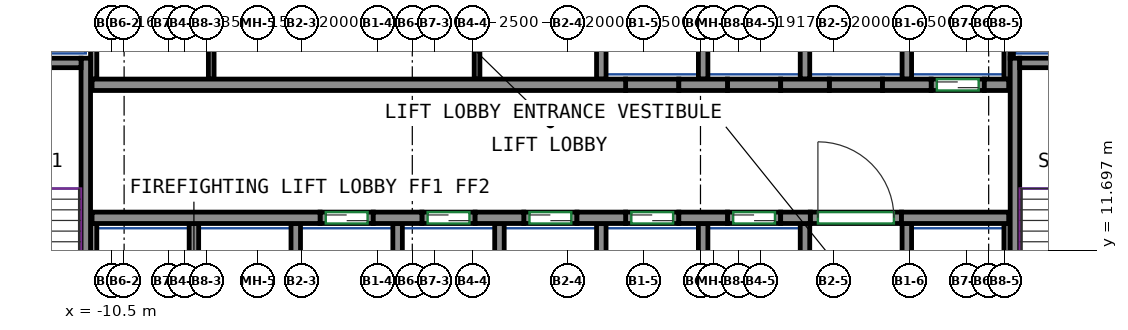
"""IFC4 building model, lengths in metres.
Left out: names, types, materials, properties, quantities, classifications, styles, units other than length and angle.
Written with IfcOpenShell. Run it as: python <this file> out.ifc"""

import sys

from ifc_helpers import new_model, si_unit, direction, frame, frame_2d, origin, place, context, subcontext, project, spatial, rectangle, extrude, source, transform, mapped, element, fill, save


model = new_model("IFC4")
c1 = context("Model", 3, precision=1e-05, world=origin(), true_north=direction((0.0, 1.0)))
c2 = subcontext(c1, "Body", "Model", "MODEL_VIEW")
j1 = project(units=[si_unit("LENGTHUNIT", "METRE"), si_unit("PLANEANGLEUNIT", "RADIAN")], contexts=[c1])
p1 = place(None, origin())
s1 = spatial("IfcSite", under=j1, at=p1, CompositionType="ELEMENT")
p2 = place(p1, origin())
s2 = spatial("IfcBuilding", under=s1, at=p2, CompositionType="ELEMENT")
p3 = place(p2, frame((0.0, 0.0, 216.9)))
s3 = spatial("IfcBuildingStorey", under=s2, at=p3, CompositionType="ELEMENT", Elevation=216.9)
m1 = source(origin(), c2, "Body", "SweptSolid", [
    extrude(rectangle(XDim=7.75, YDim=0.25, at=frame_2d((3.875, 0.0))), origin(), (0.0, 0.0, 1.0), 3.12),
])
p4 = place(p3, frame((-11.175, 9.0, 0.0), z_axis=(0.0, 0.0, 1.0), x_axis=(0.0, 1.0, 0.0)))
e1 = element("IfcWall", 1, at=p4, inside=s3, PredefinedType="SHEAR", context=c2, shape_type="MappedRepresentation", body=[
    mapped(m1, transform((0.0, 0.0, 0.0))),
])
m2 = source(origin(), c2, "Body", "SweptSolid", [
    extrude(rectangle(XDim=3.7, YDim=0.25, at=frame_2d((1.85, 0.0))), origin(), (0.0, 0.0, 1.0), 3.12),
])
p5 = place(p3, frame((-15.0, 16.625, 0.0), z_axis=(0.0, 0.0, 1.0), x_axis=(1.0, 0.0, 0.0)))
e2 = element("IfcWall", 2, at=p5, inside=s3, PredefinedType="SHEAR", context=c2, shape_type="MappedRepresentation", body=[
    mapped(m2, transform((0.0, 0.0, 0.0))),
])
p6 = place(p3, frame((13.275, 9.0, 0.0), z_axis=(0.0, 0.0, 1.0), x_axis=(0.0, 1.0, 0.0)))
e3 = element("IfcWall", 3, at=p6, inside=s3, PredefinedType="SHEAR", context=c2, shape_type="MappedRepresentation", body=[
    mapped(m1, transform((0.0, 0.0, 0.0))),
])
m3 = source(origin(), c2, "Body", "SweptSolid", [
    extrude(rectangle(XDim=3.7, YDim=0.25, at=frame_2d((1.85, 0.0))), origin(), (0.0, 0.0, 1.0), 3.12),
])
p7 = place(p3, frame((13.4, 16.625, 0.0), z_axis=(0.0, 0.0, 1.0), x_axis=(1.0, 0.0, 0.0)))
e4 = element("IfcWall", 4, at=p7, inside=s3, PredefinedType="SHEAR", context=c2, shape_type="MappedRepresentation", body=[
    mapped(m3, transform((0.0, 0.0, 0.0))),
])
m4 = source(origin(), c2, "Body", "SweptSolid", [
    extrude(rectangle(XDim=6.0, YDim=0.3, at=frame_2d((3.0, 0.0))), origin(), (0.0, 0.0, 1.0), 3.12),
])
p8 = place(p3, frame((-11.01, 12.55, 0.0), z_axis=(0.0, 0.0, 1.0), x_axis=(1.0, 0.0, 0.0)))
e5 = element("IfcWall", 5, at=p8, inside=s3, PredefinedType="SHEAR", context=c2, shape_type="MappedRepresentation", body=[
    mapped(m4, transform((0.0, 0.0, 0.0))),
])
m5 = source(origin(), c2, "Body", "SweptSolid", [
    extrude(rectangle(XDim=1.28, YDim=0.3, at=frame_2d((0.64, 0.0))), origin(), (0.0, 0.0, 1.0), 3.12),
])
for number, where, z_axis, x_axis in (
    (6, (-3.61, 12.55, 0.0), (0.0, 0.0, 1.0), (1.0, 0.0, 0.0)),
    (7, (-0.93, 12.55, 0.0), (0.0, 0.0, 1.0), (1.0, 0.0, 0.0)),
    (8, (1.75, 12.55, 0.0), (0.0, 0.0, 1.0), (1.0, 0.0, 0.0)),
    (9, (4.43, 12.55, 0.0), (0.0, 0.0, 1.0), (1.0, 0.0, 0.0)),
):
    element("IfcWall", number, at=place(p3, frame(where, z_axis=z_axis, x_axis=x_axis)), inside=s3, PredefinedType="SHEAR", context=c2, shape_type="MappedRepresentation", body=[
        mapped(m5, transform((0.0, 0.0, 0.0))),
    ])
m6 = source(origin(), c2, "Body", "SweptSolid", [
    extrude(rectangle(XDim=0.78, YDim=0.3, at=frame_2d((0.39, 0.0))), origin(), (0.0, 0.0, 1.0), 3.12),
])
p9 = place(p3, frame((7.11, 12.55, 0.0), z_axis=(0.0, 0.0, 1.0), x_axis=(1.0, 0.0, 0.0)))
e10 = element("IfcWall", 10, at=p9, inside=s3, PredefinedType="SHEAR", context=c2, shape_type="MappedRepresentation", body=[
    mapped(m6, transform((0.0, 0.0, 0.0))),
])
m7 = source(origin(), c2, "Body", "SweptSolid", [
    extrude(rectangle(XDim=2.82, YDim=0.3, at=frame_2d((1.41, 0.0))), origin(), (0.0, 0.0, 1.0), 3.12),
])
p10 = place(p3, frame((10.29, 12.55, 0.0), z_axis=(0.0, 0.0, 1.0), x_axis=(1.0, 0.0, 0.0)))
e11 = element("IfcWall", 11, at=p10, inside=s3, PredefinedType="SHEAR", context=c2, shape_type="MappedRepresentation", body=[
    mapped(m7, transform((0.0, 0.0, 0.0))),
])
m8 = source(origin(), c2, "Body", "SweptSolid", [
    extrude(rectangle(XDim=14.04, YDim=0.3, at=frame_2d((7.02, 0.0))), origin(), (0.0, 0.0, 1.0), 3.12),
])
p11 = place(p3, frame((-11.01, 16.05, 0.0), z_axis=(0.0, 0.0, 1.0), x_axis=(1.0, 0.0, 0.0)))
e12 = element("IfcWall", 12, at=p11, inside=s3, PredefinedType="SHEAR", context=c2, shape_type="MappedRepresentation", body=[
    mapped(m8, transform((0.0, 0.0, 0.0))),
])
p12 = place(p3, frame((4.43, 16.05, 0.0), z_axis=(0.0, 0.0, 1.0), x_axis=(1.0, 0.0, 0.0)))
e13 = element("IfcWall", 13, at=p12, inside=s3, PredefinedType="SHEAR", context=c2, shape_type="MappedRepresentation", body=[
    mapped(m5, transform((0.0, 0.0, 0.0))),
])
m9 = source(origin(), c2, "Body", "SweptSolid", [
    extrude(rectangle(XDim=1.28, YDim=0.3, at=frame_2d((0.64, 0.0))), origin(), (0.0, 0.0, 1.0), 3.12),
])
p13 = place(p3, frame((7.11, 16.05, 0.0), z_axis=(0.0, 0.0, 1.0), x_axis=(1.0, 0.0, 0.0)))
e14 = element("IfcWall", 14, at=p13, inside=s3, PredefinedType="SHEAR", context=c2, shape_type="MappedRepresentation", body=[
    mapped(m9, transform((0.0, 0.0, 0.0))),
])
p14 = place(p3, frame((9.79, 16.05, 0.0), z_axis=(0.0, 0.0, 1.0), x_axis=(1.0, 0.0, 0.0)))
e15 = element("IfcWall", 15, at=p14, inside=s3, PredefinedType="SHEAR", context=c2, shape_type="MappedRepresentation", body=[
    mapped(m5, transform((0.0, 0.0, 0.0))),
])
m10 = source(origin(), c2, "Body", "SweptSolid", [
    extrude(rectangle(XDim=0.64, YDim=0.3, at=frame_2d((0.32, 0.0))), origin(), (0.0, 0.0, 1.0), 3.12),
])
p15 = place(p3, frame((12.47, 16.05, 0.0), z_axis=(0.0, 0.0, 1.0), x_axis=(1.0, 0.0, 0.0)))
e16 = element("IfcWall", 16, at=p15, inside=s3, PredefinedType="SHEAR", context=c2, shape_type="MappedRepresentation", body=[
    mapped(m10, transform((0.0, 0.0, 0.0))),
])
m11 = source(origin(), c2, "Body", "SweptSolid", [
    extrude(rectangle(XDim=1.4, YDim=0.3, at=frame_2d((0.7, 0.0))), origin(), (0.0, 0.0, 1.0), 3.12),
])
p16 = place(p3, frame((-5.01, 12.55, 0.0), z_axis=(0.0, 0.0, 1.0), x_axis=(1.0, 0.0, 0.0)))
e17 = element("IfcWall", 17, at=p16, inside=s3, PredefinedType="PARTITIONING", context=c2, shape_type="MappedRepresentation", body=[
    mapped(m11, transform((0.0, 0.0, 0.0))),
])
p17 = place(p16, frame((0.15, 0.0, 0.0)))
e18 = element("IfcOpeningElement", 18, at=p17, cuts=e17, PredefinedType="OPENING", context=c2, shape_type="SweptSolid", body=[
    extrude(rectangle(XDim=1.1, YDim=2.1, at=frame_2d((0.55, 1.05))), frame((0.0, 0.16, 0.0), z_axis=(0.0, -1.0, 0.0), x_axis=(1.0, 0.0, 0.0)), (0.0, 0.0, 1.0), 0.32),
])
m12 = source(origin(), c2, "Body", "SweptSolid", [
    extrude(rectangle(XDim=1.4, YDim=0.3, at=frame_2d((0.7, 0.0))), origin(), (0.0, 0.0, 1.0), 3.12),
])
p18 = place(p3, frame((-2.33, 12.55, 0.0), z_axis=(0.0, 0.0, 1.0), x_axis=(1.0, 0.0, 0.0)))
e19 = element("IfcWall", 19, at=p18, inside=s3, PredefinedType="PARTITIONING", context=c2, shape_type="MappedRepresentation", body=[
    mapped(m12, transform((0.0, 0.0, 0.0))),
])
p19 = place(p18, frame((0.15, 0.0, 0.0)))
e20 = element("IfcOpeningElement", 20, at=p19, cuts=e19, PredefinedType="OPENING", context=c2, shape_type="SweptSolid", body=[
    extrude(rectangle(XDim=1.1, YDim=2.1, at=frame_2d((0.55, 1.05))), frame((0.0, 0.16, 0.0), z_axis=(0.0, -1.0, 0.0), x_axis=(1.0, 0.0, 0.0)), (0.0, 0.0, 1.0), 0.32),
])
p20 = place(p3, frame((0.35, 12.55, 0.0), z_axis=(0.0, 0.0, 1.0), x_axis=(1.0, 0.0, 0.0)))
e21 = element("IfcWall", 21, at=p20, inside=s3, PredefinedType="PARTITIONING", context=c2, shape_type="MappedRepresentation", body=[
    mapped(m11, transform((0.0, 0.0, 0.0))),
])
p21 = place(p20, frame((0.15, 0.0, 0.0)))
e22 = element("IfcOpeningElement", 22, at=p21, cuts=e21, PredefinedType="OPENING", context=c2, shape_type="SweptSolid", body=[
    extrude(rectangle(XDim=1.1, YDim=2.1, at=frame_2d((0.55, 1.05))), frame((0.0, 0.16, 0.0), z_axis=(0.0, -1.0, 0.0), x_axis=(1.0, 0.0, 0.0)), (0.0, 0.0, 1.0), 0.32),
])
p22 = place(p3, frame((3.03, 12.55, 0.0), z_axis=(0.0, 0.0, 1.0), x_axis=(1.0, 0.0, 0.0)))
e23 = element("IfcWall", 23, at=p22, inside=s3, PredefinedType="PARTITIONING", context=c2, shape_type="MappedRepresentation", body=[
    mapped(m11, transform((0.0, 0.0, 0.0))),
])
p23 = place(p22, frame((0.15, 0.0, 0.0)))
e24 = element("IfcOpeningElement", 24, at=p23, cuts=e23, PredefinedType="OPENING", context=c2, shape_type="SweptSolid", body=[
    extrude(rectangle(XDim=1.1, YDim=2.1, at=frame_2d((0.55, 1.05))), frame((0.0, 0.16, 0.0), z_axis=(0.0, -1.0, 0.0), x_axis=(1.0, 0.0, 0.0)), (0.0, 0.0, 1.0), 0.32),
])
p24 = place(p3, frame((5.71, 12.55, 0.0), z_axis=(0.0, 0.0, 1.0), x_axis=(1.0, 0.0, 0.0)))
e25 = element("IfcWall", 25, at=p24, inside=s3, PredefinedType="PARTITIONING", context=c2, shape_type="MappedRepresentation", body=[
    mapped(m12, transform((0.0, 0.0, 0.0))),
])
p25 = place(p24, frame((0.15, 0.0, 0.0)))
e26 = element("IfcOpeningElement", 26, at=p25, cuts=e25, PredefinedType="OPENING", context=c2, shape_type="SweptSolid", body=[
    extrude(rectangle(XDim=1.1, YDim=2.1, at=frame_2d((0.55, 1.05))), frame((0.0, 0.16, 0.0), z_axis=(0.0, -1.0, 0.0), x_axis=(1.0, 0.0, 0.0)), (0.0, 0.0, 1.0), 0.32),
])
p26 = place(p3, frame((11.07, 16.05, 0.0), z_axis=(0.0, 0.0, 1.0), x_axis=(1.0, 0.0, 0.0)))
e27 = element("IfcWall", 27, at=p26, inside=s3, PredefinedType="PARTITIONING", context=c2, shape_type="MappedRepresentation", body=[
    mapped(m11, transform((0.0, 0.0, 0.0))),
])
p27 = place(p26, frame((0.15, 0.0, 0.0)))
e28 = element("IfcOpeningElement", 28, at=p27, cuts=e27, PredefinedType="OPENING", context=c2, shape_type="SweptSolid", body=[
    extrude(rectangle(XDim=1.1, YDim=2.1, at=frame_2d((0.55, 1.05))), frame((0.0, 0.16, 0.0), z_axis=(0.0, -1.0, 0.0), x_axis=(1.0, 0.0, 0.0)), (0.0, 0.0, 1.0), 0.32),
])
m13 = source(origin(), c2, "Body", "SweptSolid", [
    extrude(rectangle(XDim=2.4, YDim=0.3, at=frame_2d((1.2, 0.0))), origin(), (0.0, 0.0, 1.0), 3.12),
])
p28 = place(p3, frame((7.89, 12.55, 0.0), z_axis=(0.0, 0.0, 1.0), x_axis=(1.0, 0.0, 0.0)))
e29 = element("IfcWall", 29, at=p28, inside=s3, PredefinedType="PARTITIONING", context=c2, shape_type="MappedRepresentation", body=[
    mapped(m13, transform((0.0, 0.0, 0.0))),
])
p29 = place(p28, frame((0.2, 0.0, 0.0)))
e30 = element("IfcOpeningElement", 30, at=p29, cuts=e29, PredefinedType="OPENING", context=c2, shape_type="SweptSolid", body=[
    extrude(rectangle(XDim=2.0, YDim=2.1, at=frame_2d((1.0, 1.05))), frame((0.0, 0.16, 0.0), z_axis=(0.0, -1.0, 0.0), x_axis=(1.0, 0.0, 0.0)), (0.0, 0.0, 1.0), 0.32),
])
p30 = place(p3, frame((3.03, 16.05, 0.0), z_axis=(0.0, 0.0, 1.0), x_axis=(1.0, 0.0, 0.0)))
e31 = element("IfcWall", 31, at=p30, inside=s3, PredefinedType="PARTITIONING", context=c2, shape_type="MappedRepresentation", body=[
    mapped(m11, transform((0.0, 0.0, 0.0))),
])
for number, where, z_axis, x_axis in (
    (32, (5.71, 16.05, 0.0), (0.0, 0.0, 1.0), (1.0, 0.0, 0.0)),
    (33, (8.39, 16.05, 0.0), (0.0, 0.0, 1.0), (1.0, 0.0, 0.0)),
):
    element("IfcWall", number, at=place(p3, frame(where, z_axis=z_axis, x_axis=x_axis)), inside=s3, PredefinedType="PARTITIONING", context=c2, shape_type="MappedRepresentation", body=[
        mapped(m12, transform((0.0, 0.0, 0.0))),
    ])
m14 = source(origin(), c2, "Body", "SweptSolid", [
    extrude(rectangle(XDim=3.275, YDim=0.165, at=frame_2d((1.638, 0.0))), origin(), (0.0, 0.0, 1.0), 3.12),
])
p31 = place(p3, frame((13.067, 16.2, 0.0), z_axis=(0.0, 0.0, 1.0), x_axis=(0.0, 1.0, 0.0)))
e34 = element("IfcWall", 34, at=p31, inside=s3, PredefinedType="PARTITIONING", context=c2, shape_type="MappedRepresentation", body=[
    mapped(m14, transform((0.0, 0.0, 0.0))),
])
m15 = source(origin(), c2, "Body", "SweptSolid", [
    extrude(rectangle(XDim=4.8, YDim=0.165, at=frame_2d((2.4, 0.0))), origin(), (0.0, 0.0, 1.0), 3.12),
])
p32 = place(p3, frame((-10.968, 16.2, 0.0), z_axis=(0.0, 0.0, 1.0), x_axis=(0.0, 1.0, 0.0)))
e35 = element("IfcWall", 35, at=p32, inside=s3, PredefinedType="PARTITIONING", context=c2, shape_type="MappedRepresentation", body=[
    mapped(m15, transform((0.0, 0.0, 0.0))),
])
m16 = source(origin(), c2, "Body", "SweptSolid", [
    extrude(rectangle(XDim=3.275, YDim=0.25, at=frame_2d((1.638, 0.0))), origin(), (0.0, 0.0, 1.0), 3.12),
])
p33 = place(p3, frame((10.43, 16.2, 0.0), z_axis=(0.0, 0.0, 1.0), x_axis=(0.0, 1.0, 0.0)))
e36 = element("IfcWall", 36, at=p33, inside=s3, PredefinedType="PARTITIONING", context=c2, shape_type="MappedRepresentation", body=[
    mapped(m16, transform((0.0, 0.0, 0.0))),
])
m17 = source(origin(), c2, "Body", "SweptSolid", [
    extrude(rectangle(XDim=2.725, YDim=0.085, at=frame_2d((1.363, 0.0))), origin(), (0.0, 0.0, 1.0), 3.12),
])
p34 = place(p3, frame((13.192, 16.75, 0.0), z_axis=(0.0, 0.0, 1.0), x_axis=(0.0, 1.0, 0.0)))
e37 = element("IfcWall", 37, at=p34, inside=s3, PredefinedType="PARTITIONING", context=c2, shape_type="MappedRepresentation", body=[
    mapped(m17, transform((0.0, 0.0, 0.0))),
])
for number, where, z_axis, x_axis in (
    (38, (2.39, 16.2, 0.0), (0.0, 0.0, 1.0), (0.0, 1.0, 0.0)),
    (39, (5.07, 16.2, 0.0), (0.0, 0.0, 1.0), (0.0, 1.0, 0.0)),
    (40, (7.75, 16.2, 0.0), (0.0, 0.0, 1.0), (0.0, 1.0, 0.0)),
):
    element("IfcWall", number, at=place(p3, frame(where, z_axis=z_axis, x_axis=x_axis)), inside=s3, PredefinedType="PARTITIONING", context=c2, shape_type="MappedRepresentation", body=[
        mapped(m16, transform((0.0, 0.0, 0.0))),
    ])
m18 = source(origin(), c2, "Body", "SweptSolid", [
    extrude(rectangle(XDim=3.4, YDim=0.25, at=frame_2d((1.7, 0.0))), origin(), (0.0, 0.0, 1.0), 3.12),
])
p35 = place(p3, frame((10.43, 9.0, 0.0), z_axis=(0.0, 0.0, 1.0), x_axis=(0.0, 1.0, 0.0)))
e41 = element("IfcWall", 41, at=p35, inside=s3, PredefinedType="PARTITIONING", context=c2, shape_type="MappedRepresentation", body=[
    mapped(m18, transform((0.0, 0.0, 0.0))),
])
m19 = source(origin(), c2, "Body", "SweptSolid", [
    extrude(rectangle(XDim=3.4, YDim=0.165, at=frame_2d((1.7, 0.0))), origin(), (0.0, 0.0, 1.0), 3.12),
])
p36 = place(p3, frame((13.067, 9.0, 0.0), z_axis=(0.0, 0.0, 1.0), x_axis=(0.0, 1.0, 0.0)))
e42 = element("IfcWall", 42, at=p36, inside=s3, PredefinedType="PARTITIONING", context=c2, shape_type="MappedRepresentation", body=[
    mapped(m19, transform((0.0, 0.0, 0.0))),
])
for number, where, z_axis, x_axis in (
    (43, (2.39, 9.0, 0.0), (0.0, 0.0, 1.0), (0.0, 1.0, 0.0)),
    (44, (5.07, 9.0, 0.0), (0.0, 0.0, 1.0), (0.0, 1.0, 0.0)),
    (45, (7.75, 9.0, 0.0), (0.0, 0.0, 1.0), (0.0, 1.0, 0.0)),
    (46, (-0.29, 9.0, 0.0), (0.0, 0.0, 1.0), (0.0, 1.0, 0.0)),
):
    element("IfcWall", number, at=place(p3, frame(where, z_axis=z_axis, x_axis=x_axis)), inside=s3, PredefinedType="PARTITIONING", context=c2, shape_type="MappedRepresentation", body=[
        mapped(m18, transform((0.0, 0.0, 0.0))),
    ])
p37 = place(p3, frame((-10.968, 9.0, 0.0), z_axis=(0.0, 0.0, 1.0), x_axis=(0.0, 1.0, 0.0)))
e47 = element("IfcWall", 47, at=p37, inside=s3, PredefinedType="PARTITIONING", context=c2, shape_type="MappedRepresentation", body=[
    mapped(m19, transform((0.0, 0.0, 0.0))),
])
for number, where, z_axis, x_axis in (
    (48, (-2.97, 9.0, 0.0), (0.0, 0.0, 1.0), (0.0, 1.0, 0.0)),
    (49, (-5.65, 9.0, 0.0), (0.0, 0.0, 1.0), (0.0, 1.0, 0.0)),
    (50, (-8.33, 9.0, 0.0), (0.0, 0.0, 1.0), (0.0, 1.0, 0.0)),
):
    element("IfcWall", number, at=place(p3, frame(where, z_axis=z_axis, x_axis=x_axis)), inside=s3, PredefinedType="PARTITIONING", context=c2, shape_type="MappedRepresentation", body=[
        mapped(m18, transform((0.0, 0.0, 0.0))),
    ])
m20 = source(origin(), c2, "Body", "SweptSolid", [
    extrude(rectangle(XDim=4.8, YDim=0.15, at=frame_2d((2.4, 0.0))), origin(), (0.0, 0.0, 1.0), 3.12),
])
for number, where, z_axis, x_axis in (
    (51, (-7.875, 16.2, 0.0), (0.0, 0.0, 1.0), (0.0, 1.0, 0.0)),
    (52, (-0.88, 16.2, 0.0), (0.0, 0.0, 1.0), (0.0, 1.0, 0.0)),
):
    element("IfcWall", number, at=place(p3, frame(where, z_axis=z_axis, x_axis=x_axis)), inside=s3, PredefinedType="PARTITIONING", context=c2, shape_type="MappedRepresentation", body=[
        mapped(m20, transform((0.0, 0.0, 0.0))),
    ])
p38 = place(p29, origin())
e53 = element("IfcDoor", 53, at=p38, inside=s3, OperationType="DOUBLE_DOOR_SINGLE_SWING", PredefinedType="DOOR", context=c2, shape_type="SweptSolid", body=[
    extrude(rectangle(XDim=2.0, YDim=2.1, at=frame_2d((1.0, 1.05))), frame((0.0, 0.025, 0.0), z_axis=(0.0, -1.0, 0.0), x_axis=(1.0, 0.0, 0.0)), (0.0, 0.0, 1.0), 0.05),
])
fill(e30, e53)
p39 = place(p17, origin())
e54 = element("IfcDoor", 54, at=p39, inside=s3, OperationType="DOUBLE_DOOR_SLIDING", PredefinedType="DOOR", context=c2, shape_type="SweptSolid", body=[
    extrude(rectangle(XDim=1.1, YDim=2.1, at=frame_2d((0.55, 1.05))), frame((0.0, 0.025, 0.0), z_axis=(0.0, -1.0, 0.0), x_axis=(1.0, 0.0, 0.0)), (0.0, 0.0, 1.0), 0.05),
])
fill(e18, e54)
p40 = place(p19, origin())
e55 = element("IfcDoor", 55, at=p40, inside=s3, OperationType="DOUBLE_DOOR_SLIDING", PredefinedType="DOOR", context=c2, shape_type="SweptSolid", body=[
    extrude(rectangle(XDim=1.1, YDim=2.1, at=frame_2d((0.55, 1.05))), frame((0.0, 0.025, 0.0), z_axis=(0.0, -1.0, 0.0), x_axis=(1.0, 0.0, 0.0)), (0.0, 0.0, 1.0), 0.05),
])
fill(e20, e55)
p41 = place(p21, origin())
e56 = element("IfcDoor", 56, at=p41, inside=s3, OperationType="DOUBLE_DOOR_SLIDING", PredefinedType="DOOR", context=c2, shape_type="SweptSolid", body=[
    extrude(rectangle(XDim=1.1, YDim=2.1, at=frame_2d((0.55, 1.05))), frame((0.0, 0.025, 0.0), z_axis=(0.0, -1.0, 0.0), x_axis=(1.0, 0.0, 0.0)), (0.0, 0.0, 1.0), 0.05),
])
fill(e22, e56)
p42 = place(p23, origin())
e57 = element("IfcDoor", 57, at=p42, inside=s3, OperationType="DOUBLE_DOOR_SLIDING", PredefinedType="DOOR", context=c2, shape_type="SweptSolid", body=[
    extrude(rectangle(XDim=1.1, YDim=2.1, at=frame_2d((0.55, 1.05))), frame((0.0, 0.025, 0.0), z_axis=(0.0, -1.0, 0.0), x_axis=(1.0, 0.0, 0.0)), (0.0, 0.0, 1.0), 0.05),
])
fill(e24, e57)
p43 = place(p25, origin())
e58 = element("IfcDoor", 58, at=p43, inside=s3, OperationType="DOUBLE_DOOR_SLIDING", PredefinedType="DOOR", context=c2, shape_type="SweptSolid", body=[
    extrude(rectangle(XDim=1.1, YDim=2.1, at=frame_2d((0.55, 1.05))), frame((0.0, 0.025, 0.0), z_axis=(0.0, -1.0, 0.0), x_axis=(1.0, 0.0, 0.0)), (0.0, 0.0, 1.0), 0.05),
])
fill(e26, e58)
p44 = place(p27, origin())
e59 = element("IfcDoor", 59, at=p44, inside=s3, OperationType="DOUBLE_DOOR_SLIDING", PredefinedType="DOOR", context=c2, shape_type="SweptSolid", body=[
    extrude(rectangle(XDim=1.1, YDim=2.1, at=frame_2d((0.55, 1.05))), frame((0.0, 0.025, 0.0), z_axis=(0.0, -1.0, 0.0), x_axis=(1.0, 0.0, 0.0)), (0.0, 0.0, 1.0), 0.05),
])
fill(e28, e59)
save(model, sys.argv[1])
